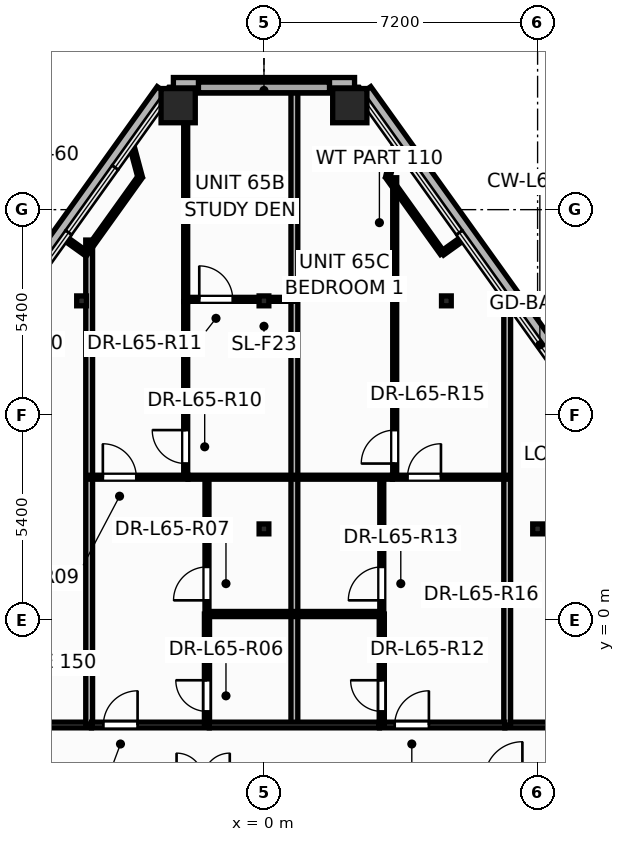
"""IFC4 building model, lengths in metres.
Left out: names, types, materials, properties, quantities, classifications, styles, units other than length and angle.
Written with IfcOpenShell. Run it as: python <this file> out.ifc"""

import sys

from ifc_helpers import new_model, si_unit, direction, frame, frame_2d, origin, origin_2d, place, context, subcontext, project, spatial, rectangle, hollow_rectangle, i_section, extrude, element, fill, save


model = new_model("IFC4")
c1 = context("Model", 3, precision=1e-05, world=origin(), true_north=direction((0.0, 1.0)))
c2 = subcontext(c1, "Body", "Model", "MODEL_VIEW")
j1 = project(units=[si_unit("LENGTHUNIT", "METRE"), si_unit("PLANEANGLEUNIT", "RADIAN")], contexts=[c1])
p1 = place(None, origin())
s1 = spatial("IfcSite", under=j1, at=p1, CompositionType="ELEMENT")
p2 = place(p1, origin())
s2 = spatial("IfcBuilding", under=s1, at=p2, CompositionType="ELEMENT")
p3 = place(p2, frame((0.0, 0.0, 249.0)))
s3 = spatial("IfcBuildingStorey", under=s2, at=p3, CompositionType="ELEMENT", Elevation=249.0)
for number, where, z_axis, x_axis in (
    (1, (2.258, 13.537, 0.0), (0.0, 0.0, 1.0), (1.0, 0.0, 0.0)),
    (2, (-2.258, 13.537, 0.0), (0.0, 0.0, 1.0), (1.0, 0.0, 0.0)),
):
    element("IfcColumn", number, at=place(p3, frame(where, z_axis=z_axis, x_axis=x_axis)), inside=s3, PredefinedType="COLUMN", context=c2, shape_type="SweptSolid", body=[
        extrude(hollow_rectangle(XDim=0.9, YDim=0.9, WallThickness=0.04, at=origin_2d()), origin(), (0.0, 0.0, 1.0), 3.6),
    ])
for number, where, z_axis, x_axis in (
    (3, (0.0, 2.4, 0.0), (0.0, 0.0, 1.0), (1.0, 0.0, 0.0)),
    (4, (7.2, 2.4, 0.0), (0.0, 0.0, 1.0), (1.0, 0.0, 0.0)),
    (5, (-4.8, 8.4, 0.0), (0.0, 0.0, 1.0), (1.0, 0.0, 0.0)),
    (6, (0.0, 8.4, 0.0), (0.0, 0.0, 1.0), (1.0, 0.0, 0.0)),
    (7, (4.8, 8.4, 0.0), (0.0, 0.0, 1.0), (1.0, 0.0, 0.0)),
):
    element("IfcColumn", number, at=place(p3, frame(where, z_axis=z_axis, x_axis=x_axis)), inside=s3, PredefinedType="COLUMN", context=c2, shape_type="SweptSolid", body=[
        extrude(i_section(OverallWidth=0.256, OverallDepth=0.26, WebThickness=0.01, FlangeThickness=0.017, at=origin_2d()), origin(), (0.0, 0.0, 1.0), 3.6),
    ])
p4 = place(p3, frame((12.115, 0.733, -0.2), z_axis=(0.0, 0.0, 1.0), x_axis=(-0.582205107077, 0.813041950513, 0.0)))
e8 = element("IfcWall", 8, at=p4, inside=s3, PredefinedType="PARAPET", context=c2, shape_type="SweptSolid", body=[
    extrude(rectangle(XDim=16.235, YDim=0.36, at=frame_2d((8.117, 0.0))), origin(), (0.0, 0.0, 1.0), 0.38),
])
p5 = place(p3, frame((2.384, 14.097, -0.2), z_axis=(0.0, 0.0, 1.0), x_axis=(-1.0, 0.0, 0.0)))
e9 = element("IfcWall", 9, at=p5, inside=s3, PredefinedType="PARAPET", context=c2, shape_type="SweptSolid", body=[
    extrude(rectangle(XDim=4.767, YDim=0.36, at=frame_2d((2.384, 0.0))), origin(), (0.0, 0.0, 1.0), 0.38),
])
p6 = place(p3, frame((-2.664, 13.932, -0.2), z_axis=(0.0, 0.0, 1.0), x_axis=(-0.582199295351, -0.813046112156, 0.0)))
e10 = element("IfcWall", 10, at=p6, inside=s3, PredefinedType="PARAPET", context=c2, shape_type="SweptSolid", body=[
    extrude(rectangle(XDim=12.802, YDim=0.36, at=frame_2d((6.401, 0.0))), origin(), (0.0, 0.0, 1.0), 0.38),
])
p7 = place(p3, frame((-14.42, -2.76, 0.0), z_axis=(0.0, 0.0, 1.0), x_axis=(1.0, 0.0, 0.0)))
e11 = element("IfcWall", 11, at=p7, inside=s3, PredefinedType="PARTITIONING", context=c2, shape_type="SweptSolid", body=[
    extrude(rectangle(XDim=9.88, YDim=0.15, at=frame_2d((4.94, 0.0))), origin(), (0.0, 0.0, 1.0), 2.32),
])
p8 = place(p7, frame((3.555, 0.0, 0.0)))
e12 = element("IfcOpeningElement", 12, at=p8, cuts=e11, PredefinedType="OPENING", context=c2, shape_type="SweptSolid", body=[
    extrude(rectangle(XDim=0.906, YDim=2.104, at=frame_2d((0.45, 1.052))), frame((0.0, 0.085, 0.0), z_axis=(0.0, -1.0, 0.0), x_axis=(1.0, 0.0, 0.0)), (0.0, 0.0, 1.0), 0.17),
])
p9 = place(p3, frame((6.34, -2.76, 0.0), z_axis=(0.0, 0.0, 1.0), x_axis=(1.0, 0.0, 0.0)))
e13 = element("IfcWall", 13, at=p9, inside=s3, PredefinedType="PARTITIONING", context=c2, shape_type="SweptSolid", body=[
    extrude(rectangle(XDim=8.08, YDim=0.15, at=frame_2d((4.04, 0.0))), origin(), (0.0, 0.0, 1.0), 2.32),
])
p10 = place(p9, frame((2.431, 0.0, 0.0)))
e14 = element("IfcOpeningElement", 14, at=p10, cuts=e13, PredefinedType="OPENING", context=c2, shape_type="SweptSolid", body=[
    extrude(rectangle(XDim=0.906, YDim=2.104, at=frame_2d((0.45, 1.052))), frame((0.0, 0.085, 0.0), z_axis=(0.0, -1.0, 0.0), x_axis=(1.0, 0.0, 0.0)), (0.0, 0.0, 1.0), 0.17),
])
p11 = place(p3, frame((3.44, 3.76, 0.0), z_axis=(0.0, 0.0, 1.0), x_axis=(0.0, 1.0, 0.0)))
e15 = element("IfcWall", 15, at=p11, inside=s3, PredefinedType="PARTITIONING", context=c2, shape_type="SweptSolid", body=[
    extrude(rectangle(XDim=7.88, YDim=0.105, at=frame_2d((3.94, 0.0))), origin(), (0.0, 0.0, 1.0), 2.718),
])
p12 = place(p11, frame((0.359, 0.0, 0.0)))
e16 = element("IfcOpeningElement", 16, at=p12, cuts=e15, PredefinedType="OPENING", context=c2, shape_type="SweptSolid", body=[
    extrude(rectangle(XDim=0.886, YDim=2.104, at=frame_2d((0.44, 1.052))), frame((0.0, 0.062, 0.0), z_axis=(0.0, -1.0, 0.0), x_axis=(1.0, 0.0, 0.0)), (0.0, 0.0, 1.0), 0.125),
])
p13 = place(p3, frame((-4.6, -2.74, 0.0), z_axis=(0.0, 0.0, 1.0), x_axis=(0.0, 1.0, 0.0)))
e17 = element("IfcWall", 17, at=p13, inside=s3, PredefinedType="PARTITIONING", context=c2, shape_type="SweptSolid", body=[
    extrude(rectangle(XDim=12.74, YDim=0.18, at=frame_2d((6.37, 0.0))), origin(), (0.0, 0.0, 1.0), 2.32),
])
p14 = place(p3, frame((6.4, -2.76, 0.0), z_axis=(0.0, 0.0, 1.0), x_axis=(0.0, 1.0, 0.0)))
e18 = element("IfcWall", 18, at=p14, inside=s3, PredefinedType="PARTITIONING", context=c2, shape_type="SweptSolid", body=[
    extrude(rectangle(XDim=11.2, YDim=0.18, at=frame_2d((5.6, 0.0))), origin(), (0.0, 0.0, 1.0), 2.32),
])
p15 = place(p3, frame((-2.06, 8.38, 0.0), z_axis=(0.0, 0.0, 1.0), x_axis=(0.0, 1.0, 0.0)))
e19 = element("IfcWall", 19, at=p15, inside=s3, PredefinedType="PARTITIONING", context=c2, shape_type="SweptSolid", body=[
    extrude(rectangle(XDim=5.557, YDim=0.105, at=frame_2d((2.778, 0.0))), origin(), (0.0, 0.0, 1.0), 2.718),
])
p16 = place(p3, frame((0.8, -2.76, 0.0), z_axis=(0.0, 0.0, 1.0), x_axis=(0.0, 1.0, 0.0)))
e20 = element("IfcWall", 20, at=p16, inside=s3, PredefinedType="PARTITIONING", context=c2, shape_type="SweptSolid", body=[
    extrude(rectangle(XDim=16.697, YDim=0.18, at=frame_2d((8.348, 0.0))), origin(), (0.0, 0.0, 1.0), 2.32),
])
p17 = place(p3, frame((-2.06, 3.76, 0.0), z_axis=(0.0, 0.0, 1.0), x_axis=(0.0, 1.0, 0.0)))
e21 = element("IfcWall", 21, at=p17, inside=s3, PredefinedType="PARTITIONING", context=c2, shape_type="SweptSolid", body=[
    extrude(rectangle(XDim=4.618, YDim=0.105, at=frame_2d((2.309, 0.0))), origin(), (0.0, 0.0, 1.0), 2.718),
])
p18 = place(p17, frame((0.36, 0.0, 0.0)))
e22 = element("IfcOpeningElement", 22, at=p18, cuts=e21, PredefinedType="OPENING", context=c2, shape_type="SweptSolid", body=[
    extrude(rectangle(XDim=0.886, YDim=2.104, at=frame_2d((0.44, 1.052))), frame((0.0, 0.062, 0.0), z_axis=(0.0, -1.0, 0.0), x_axis=(1.0, 0.0, 0.0)), (0.0, 0.0, 1.0), 0.125),
])
p19 = place(p3, frame((-1.5, 0.16, 0.0), z_axis=(0.0, 0.0, 1.0), x_axis=(0.0, 1.0, 0.0)))
e23 = element("IfcWall", 23, at=p19, inside=s3, PredefinedType="PARTITIONING", context=c2, shape_type="SweptSolid", body=[
    extrude(rectangle(XDim=3.6, YDim=0.105, at=frame_2d((1.8, 0.0))), origin(), (0.0, 0.0, 1.0), 2.32),
])
p20 = place(p19, frame((0.36, 0.0, 0.0)))
e24 = element("IfcOpeningElement", 24, at=p20, cuts=e23, PredefinedType="OPENING", context=c2, shape_type="SweptSolid", body=[
    extrude(rectangle(XDim=0.886, YDim=2.104, at=frame_2d((0.44, 1.052))), frame((0.0, 0.062, 0.0), z_axis=(0.0, -1.0, 0.0), x_axis=(1.0, 0.0, 0.0)), (0.0, 0.0, 1.0), 0.125),
])
p21 = place(p3, frame((3.1, 0.16, 0.0), z_axis=(0.0, 0.0, 1.0), x_axis=(0.0, 1.0, 0.0)))
e25 = element("IfcWall", 25, at=p21, inside=s3, PredefinedType="PARTITIONING", context=c2, shape_type="SweptSolid", body=[
    extrude(rectangle(XDim=3.6, YDim=0.105, at=frame_2d((1.8, 0.0))), origin(), (0.0, 0.0, 1.0), 2.32),
])
p22 = place(p21, frame((0.36, 0.0, 0.0)))
e26 = element("IfcOpeningElement", 26, at=p22, cuts=e25, PredefinedType="OPENING", context=c2, shape_type="SweptSolid", body=[
    extrude(rectangle(XDim=0.886, YDim=2.104, at=frame_2d((0.44, 1.052))), frame((0.0, 0.062, 0.0), z_axis=(0.0, -1.0, 0.0), x_axis=(1.0, 0.0, 0.0)), (0.0, 0.0, 1.0), 0.125),
])
p23 = place(p3, frame((3.04, -2.76, 0.0), z_axis=(0.0, 0.0, 1.0), x_axis=(1.0, 0.0, 0.0)))
e27 = element("IfcWall", 27, at=p23, inside=s3, PredefinedType="PARTITIONING", context=c2, shape_type="SweptSolid", body=[
    extrude(rectangle(XDim=3.298, YDim=0.15, at=frame_2d((1.649, 0.0))), origin(), (0.0, 0.0, 1.0), 2.964),
])
p24 = place(p23, frame((0.4, 0.0, 0.0)))
e28 = element("IfcOpeningElement", 28, at=p24, cuts=e27, PredefinedType="OPENING", context=c2, shape_type="SweptSolid", body=[
    extrude(rectangle(XDim=0.906, YDim=2.104, at=frame_2d((0.45, 1.052))), frame((0.0, 0.085, 0.0), z_axis=(0.0, -1.0, 0.0), x_axis=(1.0, 0.0, 0.0)), (0.0, 0.0, 1.0), 0.17),
])
p25 = place(p3, frame((-4.538, -2.76, 0.0), z_axis=(0.0, 0.0, 1.0), x_axis=(1.0, 0.0, 0.0)))
e29 = element("IfcWall", 29, at=p25, inside=s3, PredefinedType="PARTITIONING", context=c2, shape_type="SweptSolid", body=[
    extrude(rectangle(XDim=3.098, YDim=0.15, at=frame_2d((1.549, 0.0))), origin(), (0.0, 0.0, 1.0), 2.964),
])
p26 = place(p25, frame((0.312, 0.0, 0.0)))
e30 = element("IfcOpeningElement", 30, at=p26, cuts=e29, PredefinedType="OPENING", context=c2, shape_type="SweptSolid", body=[
    extrude(rectangle(XDim=0.906, YDim=2.104, at=frame_2d((0.45, 1.052))), frame((0.0, 0.085, 0.0), z_axis=(0.0, -1.0, 0.0), x_axis=(1.0, 0.0, 0.0)), (0.0, 0.0, 1.0), 0.17),
])
p27 = place(p3, frame((3.38, 3.76, 0.0), z_axis=(0.0, 0.0, 1.0), x_axis=(1.0, 0.0, 0.0)))
e31 = element("IfcWall", 31, at=p27, inside=s3, PredefinedType="PARTITIONING", context=c2, shape_type="SweptSolid", body=[
    extrude(rectangle(XDim=3.02, YDim=0.105, at=frame_2d((1.51, 0.0))), origin(), (0.0, 0.0, 1.0), 3.345),
])
p28 = place(p27, frame((0.397, 0.0, 0.0)))
e32 = element("IfcOpeningElement", 32, at=p28, cuts=e31, PredefinedType="OPENING", context=c2, shape_type="SweptSolid", body=[
    extrude(rectangle(XDim=0.886, YDim=2.104, at=frame_2d((0.44, 1.052))), frame((0.0, 0.062, 0.0), z_axis=(0.0, -1.0, 0.0), x_axis=(1.0, 0.0, 0.0)), (0.0, 0.0, 1.0), 0.125),
])
p29 = place(p3, frame((-1.5, -2.76, 0.0), z_axis=(0.0, 0.0, 1.0), x_axis=(0.0, 1.0, 0.0)))
e33 = element("IfcWall", 33, at=p29, inside=s3, PredefinedType="PARTITIONING", context=c2, shape_type="SweptSolid", body=[
    extrude(rectangle(XDim=2.92, YDim=0.135, at=frame_2d((1.46, 0.0))), origin(), (0.0, 0.0, 1.0), 3.345),
])
p30 = place(p29, frame((0.357, 0.0, 0.0)))
e34 = element("IfcOpeningElement", 34, at=p30, cuts=e33, PredefinedType="OPENING", context=c2, shape_type="SweptSolid", body=[
    extrude(rectangle(XDim=0.826, YDim=2.104, at=frame_2d((0.41, 1.052))), frame((0.0, 0.078, 0.0), z_axis=(0.0, -1.0, 0.0), x_axis=(1.0, 0.0, 0.0)), (0.0, 0.0, 1.0), 0.155),
])
p31 = place(p3, frame((3.1, -2.76, 0.0), z_axis=(0.0, 0.0, 1.0), x_axis=(0.0, 1.0, 0.0)))
e35 = element("IfcWall", 35, at=p31, inside=s3, PredefinedType="PARTITIONING", context=c2, shape_type="SweptSolid", body=[
    extrude(rectangle(XDim=2.92, YDim=0.135, at=frame_2d((1.46, 0.0))), origin(), (0.0, 0.0, 1.0), 3.345),
])
p32 = place(p31, frame((0.357, 0.0, 0.0)))
e36 = element("IfcOpeningElement", 36, at=p32, cuts=e35, PredefinedType="OPENING", context=c2, shape_type="SweptSolid", body=[
    extrude(rectangle(XDim=0.826, YDim=2.104, at=frame_2d((0.41, 1.052))), frame((0.0, 0.078, 0.0), z_axis=(0.0, -1.0, 0.0), x_axis=(1.0, 0.0, 0.0)), (0.0, 0.0, 1.0), 0.155),
])
p33 = place(p3, frame((-2.06, 8.44, 0.0), z_axis=(0.0, 0.0, 1.0), x_axis=(1.0, 0.0, 0.0)))
e37 = element("IfcWall", 37, at=p33, inside=s3, PredefinedType="PARTITIONING", context=c2, shape_type="SweptSolid", body=[
    extrude(rectangle(XDim=2.86, YDim=0.105, at=frame_2d((1.43, 0.0))), origin(), (0.0, 0.0, 1.0), 2.32),
])
p34 = place(p33, frame((0.357, 0.0, 0.0)))
e38 = element("IfcOpeningElement", 38, at=p34, cuts=e37, PredefinedType="OPENING", context=c2, shape_type="SweptSolid", body=[
    extrude(rectangle(XDim=0.886, YDim=2.104, at=frame_2d((0.44, 1.052))), frame((0.0, 0.062, 0.0), z_axis=(0.0, -1.0, 0.0), x_axis=(1.0, 0.0, 0.0)), (0.0, 0.0, 1.0), 0.125),
])
p35 = place(p3, frame((-4.6, 3.76, 0.0), z_axis=(0.0, 0.0, 1.0), x_axis=(1.0, 0.0, 0.0)))
e39 = element("IfcWall", 39, at=p35, inside=s3, PredefinedType="PARTITIONING", context=c2, shape_type="SweptSolid", body=[
    extrude(rectangle(XDim=2.6, YDim=0.105, at=frame_2d((1.3, 0.0))), origin(), (0.0, 0.0, 1.0), 2.964),
])
p36 = place(p35, frame((0.36, 0.0, 0.0)))
e40 = element("IfcOpeningElement", 40, at=p36, cuts=e39, PredefinedType="OPENING", context=c2, shape_type="SweptSolid", body=[
    extrude(rectangle(XDim=0.886, YDim=2.104, at=frame_2d((0.44, 1.052))), frame((0.0, 0.062, 0.0), z_axis=(0.0, -1.0, 0.0), x_axis=(1.0, 0.0, 0.0)), (0.0, 0.0, 1.0), 0.125),
])
for number, where, z_axis, x_axis in (
    (41, (-3.26, 11.657, 0.0), (0.0, 0.0, 1.0), (-0.582, -0.813, 0.0)),
    (42, (4.693, 9.656, 0.0), (0.0, 0.0, 1.0), (-0.582, 0.813, 0.0)),
):
    element("IfcWall", number, at=place(p3, frame(where, z_axis=z_axis, x_axis=x_axis)), inside=s3, PredefinedType="PARTITIONING", context=c2, shape_type="SweptSolid", body=[
        extrude(rectangle(XDim=2.461, YDim=0.12, at=frame_2d((1.23, 0.0))), origin(), (0.0, 0.0, 1.0), 2.718),
    ])
p37 = place(p3, frame((-1.438, -2.76, 0.0), z_axis=(0.0, 0.0, 1.0), x_axis=(1.0, 0.0, 0.0)))
e43 = element("IfcWall", 43, at=p37, inside=s3, PredefinedType="PARTITIONING", context=c2, shape_type="SweptSolid", body=[
    extrude(rectangle(XDim=4.476, YDim=0.15, at=frame_2d((2.238, 0.0))), origin(), (0.0, 0.0, 1.0), 2.32),
])
p38 = place(p3, frame((-1.5, 0.16, 0.0), z_axis=(0.0, 0.0, 1.0), x_axis=(1.0, 0.0, 0.0)))
e44 = element("IfcWall", 44, at=p38, inside=s3, PredefinedType="PARTITIONING", context=c2, shape_type="SweptSolid", body=[
    extrude(rectangle(XDim=4.6, YDim=0.135, at=frame_2d((2.3, 0.0))), origin(), (0.0, 0.0, 1.0), 2.32),
])
p39 = place(p3, frame((-1.998, 3.76, 0.0), z_axis=(0.0, 0.0, 1.0), x_axis=(1.0, 0.0, 0.0)))
e45 = element("IfcWall", 45, at=p39, inside=s3, PredefinedType="PARTITIONING", context=c2, shape_type="SweptSolid", body=[
    extrude(rectangle(XDim=5.376, YDim=0.105, at=frame_2d((2.688, 0.0))), origin(), (0.0, 0.0, 1.0), 2.32),
])
p40 = place(p3, frame((-3.483, 12.495, 0.0), z_axis=(0.0, 0.0, 1.0), x_axis=(0.257400005841, -0.966304939961, 0.0)))
e46 = element("IfcWall", 46, at=p40, inside=s3, PredefinedType="PARTITIONING", context=c2, shape_type="SweptSolid", body=[
    extrude(rectangle(XDim=0.868, YDim=0.12, at=frame_2d((0.434, 0.0))), origin(), (0.0, 0.0, 1.0), 2.718),
])
p41 = place(p3, frame((3.26, 11.657, 0.0), z_axis=(0.0, 0.0, 1.0), x_axis=(0.237990769986, 0.971267416009, 0.0)))
e47 = element("IfcWall", 47, at=p41, inside=s3, PredefinedType="PARTITIONING", context=c2, shape_type="SweptSolid", body=[
    extrude(rectangle(XDim=0.847, YDim=0.12, at=frame_2d((0.424, 0.0))), origin(), (0.0, 0.0, 1.0), 2.718),
])
for number, where, z_axis, x_axis in (
    (48, (-4.693, 9.656, 0.0), (0.0, 0.0, 1.0), (-0.813, 0.582, 0.0)),
    (49, (5.238, 10.046, 0.0), (0.0, 0.0, 1.0), (-0.813, -0.582, 0.0)),
):
    element("IfcWall", number, at=place(p3, frame(where, z_axis=z_axis, x_axis=x_axis)), inside=s3, PredefinedType="PARTITIONING", context=c2, shape_type="SweptSolid", body=[
        extrude(rectangle(XDim=0.67, YDim=0.12, at=frame_2d((0.335, 0.0))), origin(), (0.0, 0.0, 1.0), 2.863),
    ])
p42 = place(p30, origin())
e50 = element("IfcDoor", 50, at=p42, inside=s3, OperationType="SINGLE_SWING_RIGHT", PredefinedType="DOOR", context=c2, shape_type="SweptSolid", body=[
    extrude(rectangle(XDim=0.82, YDim=2.1, at=frame_2d((0.41, 1.05))), frame((0.0, 0.025, 0.0), z_axis=(0.0, -1.0, 0.0), x_axis=(1.0, 0.0, 0.0)), (0.0, 0.0, 1.0), 0.05),
])
fill(e34, e50)
p43 = place(p20, origin())
e51 = element("IfcDoor", 51, at=p43, inside=s3, OperationType="SINGLE_SWING_LEFT", PredefinedType="DOOR", context=c2, shape_type="SweptSolid", body=[
    extrude(rectangle(XDim=0.88, YDim=2.1, at=frame_2d((0.44, 1.05))), frame((0.0, 0.025, 0.0), z_axis=(0.0, -1.0, 0.0), x_axis=(1.0, 0.0, 0.0)), (0.0, 0.0, 1.0), 0.05),
])
fill(e24, e51)
p44 = place(p26, origin())
e52 = element("IfcDoor", 52, at=p44, inside=s3, OperationType="SINGLE_SWING_RIGHT", PredefinedType="DOOR", context=c2, shape_type="SweptSolid", body=[
    extrude(rectangle(XDim=0.9, YDim=2.1, at=frame_2d((0.45, 1.05))), frame((0.0, 0.025, 0.0), z_axis=(0.0, -1.0, 0.0), x_axis=(1.0, 0.0, 0.0)), (0.0, 0.0, 1.0), 0.05),
])
fill(e30, e52)
p45 = place(p36, origin())
e53 = element("IfcDoor", 53, at=p45, inside=s3, OperationType="SINGLE_SWING_LEFT", PredefinedType="DOOR", context=c2, shape_type="SweptSolid", body=[
    extrude(rectangle(XDim=0.88, YDim=2.1, at=frame_2d((0.44, 1.05))), frame((0.0, 0.025, 0.0), z_axis=(0.0, -1.0, 0.0), x_axis=(1.0, 0.0, 0.0)), (0.0, 0.0, 1.0), 0.05),
])
fill(e40, e53)
p46 = place(p18, origin())
e54 = element("IfcDoor", 54, at=p46, inside=s3, OperationType="SINGLE_SWING_RIGHT", PredefinedType="DOOR", context=c2, shape_type="SweptSolid", body=[
    extrude(rectangle(XDim=0.88, YDim=2.1, at=frame_2d((0.44, 1.05))), frame((0.0, 0.025, 0.0), z_axis=(0.0, -1.0, 0.0), x_axis=(1.0, 0.0, 0.0)), (0.0, 0.0, 1.0), 0.05),
])
fill(e22, e54)
p47 = place(p34, origin())
e55 = element("IfcDoor", 55, at=p47, inside=s3, OperationType="SINGLE_SWING_LEFT", PredefinedType="DOOR", context=c2, shape_type="SweptSolid", body=[
    extrude(rectangle(XDim=0.88, YDim=2.1, at=frame_2d((0.44, 1.05))), frame((0.0, 0.025, 0.0), z_axis=(0.0, -1.0, 0.0), x_axis=(1.0, 0.0, 0.0)), (0.0, 0.0, 1.0), 0.05),
])
fill(e38, e55)
p48 = place(p32, origin())
e56 = element("IfcDoor", 56, at=p48, inside=s3, OperationType="SINGLE_SWING_RIGHT", PredefinedType="DOOR", context=c2, shape_type="SweptSolid", body=[
    extrude(rectangle(XDim=0.82, YDim=2.1, at=frame_2d((0.41, 1.05))), frame((0.0, 0.025, 0.0), z_axis=(0.0, -1.0, 0.0), x_axis=(1.0, 0.0, 0.0)), (0.0, 0.0, 1.0), 0.05),
])
fill(e36, e56)
p49 = place(p22, origin())
e57 = element("IfcDoor", 57, at=p49, inside=s3, OperationType="SINGLE_SWING_LEFT", PredefinedType="DOOR", context=c2, shape_type="SweptSolid", body=[
    extrude(rectangle(XDim=0.88, YDim=2.1, at=frame_2d((0.44, 1.05))), frame((0.0, 0.025, 0.0), z_axis=(0.0, -1.0, 0.0), x_axis=(1.0, 0.0, 0.0)), (0.0, 0.0, 1.0), 0.05),
])
fill(e26, e57)
p50 = place(p24, origin())
e58 = element("IfcDoor", 58, at=p50, inside=s3, OperationType="SINGLE_SWING_RIGHT", PredefinedType="DOOR", context=c2, shape_type="SweptSolid", body=[
    extrude(rectangle(XDim=0.9, YDim=2.1, at=frame_2d((0.45, 1.05))), frame((0.0, 0.025, 0.0), z_axis=(0.0, -1.0, 0.0), x_axis=(1.0, 0.0, 0.0)), (0.0, 0.0, 1.0), 0.05),
])
fill(e28, e58)
p51 = place(p12, origin())
e59 = element("IfcDoor", 59, at=p51, inside=s3, OperationType="SINGLE_SWING_LEFT", PredefinedType="DOOR", context=c2, shape_type="SweptSolid", body=[
    extrude(rectangle(XDim=0.88, YDim=2.1, at=frame_2d((0.44, 1.05))), frame((0.0, 0.025, 0.0), z_axis=(0.0, -1.0, 0.0), x_axis=(1.0, 0.0, 0.0)), (0.0, 0.0, 1.0), 0.05),
])
fill(e16, e59)
p52 = place(p28, origin())
e60 = element("IfcDoor", 60, at=p52, inside=s3, OperationType="SINGLE_SWING_RIGHT", PredefinedType="DOOR", context=c2, shape_type="SweptSolid", body=[
    extrude(rectangle(XDim=0.88, YDim=2.1, at=frame_2d((0.44, 1.05))), frame((0.0, 0.025, 0.0), z_axis=(0.0, -1.0, 0.0), x_axis=(1.0, 0.0, 0.0)), (0.0, 0.0, 1.0), 0.05),
])
fill(e32, e60)
save(model, sys.argv[1])
